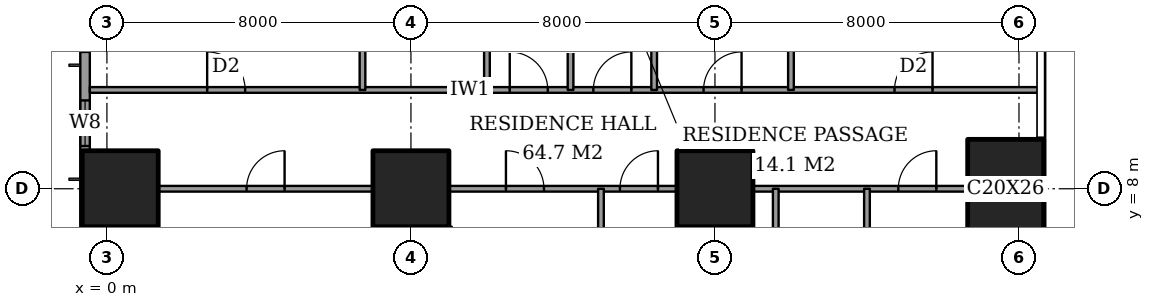
"""IFC4 building model, lengths in metres.
Left out: names, types, materials, properties, quantities, classifications, styles, units other than length and angle.
Written with IfcOpenShell. Run it as: python <this file> out.ifc"""

import sys

from ifc_helpers import new_model, si_unit, direction, frame, frame_2d, origin, origin_2d, place, context, subcontext, project, spatial, rectangle, extrude, element, fill, save


model = new_model("IFC4")
c1 = context("Model", 3, precision=1e-05, world=origin(), true_north=direction((0.0, 1.0)))
c2 = subcontext(c1, "Body", "Model", "MODEL_VIEW")
j1 = project(units=[si_unit("LENGTHUNIT", "METRE"), si_unit("PLANEANGLEUNIT", "RADIAN")], contexts=[c1])
p1 = place(None, origin())
s1 = spatial("IfcSite", under=j1, at=p1, CompositionType="ELEMENT")
p2 = place(p1, origin())
s2 = spatial("IfcBuilding", under=s1, at=p2, CompositionType="ELEMENT")
p3 = place(p2, frame((0.0, 0.0, 54.8)))
s3 = spatial("IfcBuildingStorey", under=s2, at=p3, CompositionType="ELEMENT", Elevation=54.8)
for number, where, z_axis, x_axis in (
    (1, (0.35, 8.0, 0.0), (0.0, 0.0, 1.0), (1.0, 0.0, 0.0)),
    (2, (8.0, 8.0, 0.0), (0.0, 0.0, 1.0), (1.0, 0.0, 0.0)),
    (3, (16.0, 8.0, 0.0), (0.0, 0.0, 1.0), (1.0, 0.0, 0.0)),
):
    element("IfcColumn", number, at=place(p3, frame(where, z_axis=z_axis, x_axis=x_axis)), inside=s3, PredefinedType="COLUMN", context=c2, shape_type="SweptSolid", body=[
        extrude(rectangle(XDim=2.0, YDim=2.0, at=origin_2d()), origin(), (0.0, 0.0, 1.0), 3.6),
    ])
p4 = place(p3, frame((23.65, 8.0, 0.0), z_axis=(0.0, 0.0, 1.0), x_axis=(1.0, 0.0, 0.0)))
e4 = element("IfcColumn", 4, at=p4, inside=s3, PredefinedType="COLUMN", context=c2, shape_type="SweptSolid", body=[
    extrude(rectangle(XDim=2.0, YDim=2.6, at=origin_2d()), origin(), (0.0, 0.0, 1.0), 3.6),
])
p5 = place(p3, frame((-0.575, 44.825, 0.0), z_axis=(0.0, 0.0, 1.0), x_axis=(0.0, -1.0, 0.0)))
e5 = element("IfcWall", 5, at=p5, inside=s3, PredefinedType="SOLIDWALL", context=c2, shape_type="SweptSolid", body=[
    extrude(rectangle(XDim=41.65, YDim=0.25, at=frame_2d((20.825, 0.0))), origin(), (0.0, 0.0, 1.0), 3.6),
])
p6 = place(p5, frame((0.775, 0.0, 0.6)))
e6 = element("IfcOpeningElement", 6, at=p6, cuts=e5, PredefinedType="OPENING", context=c2, shape_type="SweptSolid", body=[
    extrude(rectangle(XDim=2.4, YDim=2.0, at=frame_2d((1.2, 1.0))), frame((0.0, 0.135, 0.0), z_axis=(0.0, -1.0, 0.0), x_axis=(1.0, 0.0, 0.0)), (0.0, 0.0, 1.0), 0.27),
])
p7 = place(p5, frame((6.1, 0.0, 0.6)))
e7 = element("IfcOpeningElement", 7, at=p7, cuts=e5, PredefinedType="OPENING", context=c2, shape_type="SweptSolid", body=[
    extrude(rectangle(XDim=1.2, YDim=2.0, at=frame_2d((0.6, 1.0))), frame((0.0, 0.135, 0.0), z_axis=(0.0, -1.0, 0.0), x_axis=(1.0, 0.0, 0.0)), (0.0, 0.0, 1.0), 0.27),
])
p8 = place(p5, frame((8.425, 0.0, 0.6)))
e8 = element("IfcOpeningElement", 8, at=p8, cuts=e5, PredefinedType="OPENING", context=c2, shape_type="SweptSolid", body=[
    extrude(rectangle(XDim=2.4, YDim=2.0, at=frame_2d((1.2, 1.0))), frame((0.0, 0.135, 0.0), z_axis=(0.0, -1.0, 0.0), x_axis=(1.0, 0.0, 0.0)), (0.0, 0.0, 1.0), 0.27),
])
p9 = place(p5, frame((15.625, 0.0, 0.6)))
e9 = element("IfcOpeningElement", 9, at=p9, cuts=e5, PredefinedType="OPENING", context=c2, shape_type="SweptSolid", body=[
    extrude(rectangle(XDim=2.4, YDim=2.0, at=frame_2d((1.2, 1.0))), frame((0.0, 0.135, 0.0), z_axis=(0.0, -1.0, 0.0), x_axis=(1.0, 0.0, 0.0)), (0.0, 0.0, 1.0), 0.27),
])
p10 = place(p5, frame((23.625, 0.0, 0.6)))
e10 = element("IfcOpeningElement", 10, at=p10, cuts=e5, PredefinedType="OPENING", context=c2, shape_type="SweptSolid", body=[
    extrude(rectangle(XDim=2.4, YDim=2.0, at=frame_2d((1.2, 1.0))), frame((0.0, 0.135, 0.0), z_axis=(0.0, -1.0, 0.0), x_axis=(1.0, 0.0, 0.0)), (0.0, 0.0, 1.0), 0.27),
])
p11 = place(p5, frame((30.825, 0.0, 0.6)))
e11 = element("IfcOpeningElement", 11, at=p11, cuts=e5, PredefinedType="OPENING", context=c2, shape_type="SweptSolid", body=[
    extrude(rectangle(XDim=2.4, YDim=2.0, at=frame_2d((1.2, 1.0))), frame((0.0, 0.135, 0.0), z_axis=(0.0, -1.0, 0.0), x_axis=(1.0, 0.0, 0.0)), (0.0, 0.0, 1.0), 0.27),
])
p12 = place(p5, frame((34.5, 0.0, 0.6)))
e12 = element("IfcOpeningElement", 12, at=p12, cuts=e5, PredefinedType="OPENING", context=c2, shape_type="SweptSolid", body=[
    extrude(rectangle(XDim=1.2, YDim=2.0, at=frame_2d((0.6, 1.0))), frame((0.0, 0.135, 0.0), z_axis=(0.0, -1.0, 0.0), x_axis=(1.0, 0.0, 0.0)), (0.0, 0.0, 1.0), 0.27),
])
p13 = place(p5, frame((38.475, 0.0, 0.6)))
e13 = element("IfcOpeningElement", 13, at=p13, cuts=e5, PredefinedType="OPENING", context=c2, shape_type="SweptSolid", body=[
    extrude(rectangle(XDim=2.4, YDim=2.0, at=frame_2d((1.2, 1.0))), frame((0.0, 0.135, 0.0), z_axis=(0.0, -1.0, 0.0), x_axis=(1.0, 0.0, 0.0)), (0.0, 0.0, 1.0), 0.27),
])
p14 = place(p3, frame((1.35, 8.0, 0.0), z_axis=(0.0, 0.0, 1.0), x_axis=(1.0, 0.0, 0.0)))
e14 = element("IfcWall", 14, at=p14, inside=s3, PredefinedType="PARTITIONING", context=c2, shape_type="SweptSolid", body=[
    extrude(rectangle(XDim=5.65, YDim=0.15, at=frame_2d((2.825, 0.0))), origin(), (0.0, 0.0, 1.0), 3.35),
])
p15 = place(p14, frame((2.325, 0.0, 0.0)))
e15 = element("IfcOpeningElement", 15, at=p15, cuts=e14, PredefinedType="OPENING", context=c2, shape_type="SweptSolid", body=[
    extrude(rectangle(XDim=1.0, YDim=2.1, at=frame_2d((0.5, 1.05))), frame((0.0, 0.085, 0.0), z_axis=(0.0, -1.0, 0.0), x_axis=(1.0, 0.0, 0.0)), (0.0, 0.0, 1.0), 0.17),
])
p16 = place(p3, frame((9.0, 8.0, 0.0), z_axis=(0.0, 0.0, 1.0), x_axis=(1.0, 0.0, 0.0)))
e16 = element("IfcWall", 16, at=p16, inside=s3, PredefinedType="PARTITIONING", context=c2, shape_type="SweptSolid", body=[
    extrude(rectangle(XDim=6.0, YDim=0.15, at=frame_2d((3.0, 0.0))), origin(), (0.0, 0.0, 1.0), 3.35),
])
p17 = place(p16, frame((1.5, 0.0, 0.0)))
e17 = element("IfcOpeningElement", 17, at=p17, cuts=e16, PredefinedType="OPENING", context=c2, shape_type="SweptSolid", body=[
    extrude(rectangle(XDim=1.0, YDim=2.1, at=frame_2d((0.5, 1.05))), frame((0.0, 0.085, 0.0), z_axis=(0.0, -1.0, 0.0), x_axis=(1.0, 0.0, 0.0)), (0.0, 0.0, 1.0), 0.17),
])
p18 = place(p16, frame((4.5, 0.0, 0.0)))
e18 = element("IfcOpeningElement", 18, at=p18, cuts=e16, PredefinedType="OPENING", context=c2, shape_type="SweptSolid", body=[
    extrude(rectangle(XDim=1.0, YDim=2.1, at=frame_2d((0.5, 1.05))), frame((0.0, 0.085, 0.0), z_axis=(0.0, -1.0, 0.0), x_axis=(1.0, 0.0, 0.0)), (0.0, 0.0, 1.0), 0.17),
])
p19 = place(p3, frame((17.0, 8.0, 0.0), z_axis=(0.0, 0.0, 1.0), x_axis=(1.0, 0.0, 0.0)))
e19 = element("IfcWall", 19, at=p19, inside=s3, PredefinedType="PARTITIONING", context=c2, shape_type="SweptSolid", body=[
    extrude(rectangle(XDim=5.65, YDim=0.15, at=frame_2d((2.825, 0.0))), origin(), (0.0, 0.0, 1.0), 3.35),
])
p20 = place(p19, frame((3.825, 0.0, 0.0)))
e20 = element("IfcOpeningElement", 20, at=p20, cuts=e19, PredefinedType="OPENING", context=c2, shape_type="SweptSolid", body=[
    extrude(rectangle(XDim=1.0, YDim=2.1, at=frame_2d((0.5, 1.05))), frame((0.0, 0.085, 0.0), z_axis=(0.0, -1.0, 0.0), x_axis=(1.0, 0.0, 0.0)), (0.0, 0.0, 1.0), 0.17),
])
p21 = place(p3, frame((-0.45, 10.6, 0.0), z_axis=(0.0, 0.0, 1.0), x_axis=(1.0, 0.0, 0.0)))
e21 = element("IfcWall", 21, at=p21, inside=s3, PredefinedType="PARTITIONING", context=c2, shape_type="SweptSolid", body=[
    extrude(rectangle(XDim=25.011, YDim=0.15, at=frame_2d((12.505, 0.0))), origin(), (0.0, 0.0, 1.0), 3.35),
])
p22 = place(p21, frame((13.25, 0.0, 0.0)))
e22 = element("IfcOpeningElement", 22, at=p22, cuts=e21, PredefinedType="OPENING", context=c2, shape_type="SweptSolid", body=[
    extrude(rectangle(XDim=1.0, YDim=2.1, at=frame_2d((0.5, 1.05))), frame((0.0, 0.085, 0.0), z_axis=(0.0, -1.0, 0.0), x_axis=(1.0, 0.0, 0.0)), (0.0, 0.0, 1.0), 0.17),
])
p23 = place(p21, frame((3.087, 0.0, 0.0)))
e23 = element("IfcOpeningElement", 23, at=p23, cuts=e21, PredefinedType="OPENING", context=c2, shape_type="SweptSolid", body=[
    extrude(rectangle(XDim=1.0, YDim=2.1, at=frame_2d((0.5, 1.05))), frame((0.0, 0.085, 0.0), z_axis=(0.0, -1.0, 0.0), x_axis=(1.0, 0.0, 0.0)), (0.0, 0.0, 1.0), 0.17),
])
p24 = place(p21, frame((11.05, 0.0, 0.0)))
e24 = element("IfcOpeningElement", 24, at=p24, cuts=e21, PredefinedType="OPENING", context=c2, shape_type="SweptSolid", body=[
    extrude(rectangle(XDim=1.0, YDim=2.1, at=frame_2d((0.5, 1.05))), frame((0.0, 0.085, 0.0), z_axis=(0.0, -1.0, 0.0), x_axis=(1.0, 0.0, 0.0)), (0.0, 0.0, 1.0), 0.17),
])
p25 = place(p21, frame((16.15, 0.0, 0.0)))
e25 = element("IfcOpeningElement", 25, at=p25, cuts=e21, PredefinedType="OPENING", context=c2, shape_type="SweptSolid", body=[
    extrude(rectangle(XDim=1.0, YDim=2.1, at=frame_2d((0.5, 1.05))), frame((0.0, 0.085, 0.0), z_axis=(0.0, -1.0, 0.0), x_axis=(1.0, 0.0, 0.0)), (0.0, 0.0, 1.0), 0.17),
])
p26 = place(p21, frame((21.175, 0.0, 0.0)))
e26 = element("IfcOpeningElement", 26, at=p26, cuts=e21, PredefinedType="OPENING", context=c2, shape_type="SweptSolid", body=[
    extrude(rectangle(XDim=1.0, YDim=2.1, at=frame_2d((0.5, 1.05))), frame((0.0, 0.085, 0.0), z_axis=(0.0, -1.0, 0.0), x_axis=(1.0, 0.0, 0.0)), (0.0, 0.0, 1.0), 0.17),
])
p27 = place(p3, frame((6.725, 10.6, 0.0), z_axis=(0.0, 0.0, 1.0), x_axis=(0.0, 1.0, 0.0)))
e27 = element("IfcWall", 27, at=p27, inside=s3, PredefinedType="PARTITIONING", context=c2, shape_type="SweptSolid", body=[
    extrude(rectangle(XDim=4.2, YDim=0.15, at=frame_2d((2.1, 0.0))), origin(), (0.0, 0.0, 1.0), 3.35),
])
p28 = place(p27, frame((1.2, 0.0, 0.0)))
e28 = element("IfcOpeningElement", 28, at=p28, cuts=e27, PredefinedType="OPENING", context=c2, shape_type="SweptSolid", body=[
    extrude(rectangle(XDim=0.9, YDim=2.1, at=frame_2d((0.45, 1.05))), frame((0.0, 0.085, 0.0), z_axis=(0.0, -1.0, 0.0), x_axis=(1.0, 0.0, 0.0)), (0.0, 0.0, 1.0), 0.17),
])
p29 = place(p3, frame((10.0, 10.6, 0.0), z_axis=(0.0, 0.0, 1.0), x_axis=(0.0, 1.0, 0.0)))
e29 = element("IfcWall", 29, at=p29, inside=s3, PredefinedType="PARTITIONING", context=c2, shape_type="SweptSolid", body=[
    extrude(rectangle(XDim=11.0, YDim=0.15, at=frame_2d((5.5, 0.0))), origin(), (0.0, 0.0, 1.0), 3.35),
])
p30 = place(p29, frame((8.2, 0.0, 0.0)))
e30 = element("IfcOpeningElement", 30, at=p30, cuts=e29, PredefinedType="OPENING", context=c2, shape_type="SweptSolid", body=[
    extrude(rectangle(XDim=1.0, YDim=2.1, at=frame_2d((0.5, 1.05))), frame((0.0, 0.085, 0.0), z_axis=(0.0, -1.0, 0.0), x_axis=(1.0, 0.0, 0.0)), (0.0, 0.0, 1.0), 0.17),
])
p31 = place(p3, frame((12.2, 10.6, 0.0), z_axis=(0.0, 0.0, 1.0), x_axis=(0.0, 1.0, 0.0)))
e31 = element("IfcWall", 31, at=p31, inside=s3, PredefinedType="PARTITIONING", context=c2, shape_type="SweptSolid", body=[
    extrude(rectangle(XDim=6.4, YDim=0.15, at=frame_2d((3.2, 0.0))), origin(), (0.0, 0.0, 1.0), 3.35),
])
p32 = place(p3, frame((13.0, -0.45, 0.0), z_axis=(0.0, 0.0, 1.0), x_axis=(0.0, 1.0, 0.0)))
e32 = element("IfcWall", 32, at=p32, inside=s3, PredefinedType="PARTITIONING", context=c2, shape_type="SweptSolid", body=[
    extrude(rectangle(XDim=8.45, YDim=0.15, at=frame_2d((4.225, 0.0))), origin(), (0.0, 0.0, 1.0), 3.35),
])
p33 = place(p3, frame((14.4, 10.6, 0.0), z_axis=(0.0, 0.0, 1.0), x_axis=(0.0, 1.0, 0.0)))
e33 = element("IfcWall", 33, at=p33, inside=s3, PredefinedType="PARTITIONING", context=c2, shape_type="SweptSolid", body=[
    extrude(rectangle(XDim=6.4, YDim=0.15, at=frame_2d((3.2, 0.0))), origin(), (0.0, 0.0, 1.0), 3.35),
])
p34 = place(p3, frame((17.6, -0.45, 0.0), z_axis=(0.0, 0.0, 1.0), x_axis=(0.0, 1.0, 0.0)))
e34 = element("IfcWall", 34, at=p34, inside=s3, PredefinedType="PARTITIONING", context=c2, shape_type="SweptSolid", body=[
    extrude(rectangle(XDim=8.45, YDim=0.15, at=frame_2d((4.225, 0.0))), origin(), (0.0, 0.0, 1.0), 3.35),
])
p35 = place(p3, frame((18.0, 10.6, 0.0), z_axis=(0.0, 0.0, 1.0), x_axis=(0.0, 1.0, 0.0)))
e35 = element("IfcWall", 35, at=p35, inside=s3, PredefinedType="PARTITIONING", context=c2, shape_type="SweptSolid", body=[
    extrude(rectangle(XDim=6.4, YDim=0.15, at=frame_2d((3.2, 0.0))), origin(), (0.0, 0.0, 1.0), 3.35),
])
p36 = place(p3, frame((20.0, -0.45, 0.0), z_axis=(0.0, 0.0, 1.0), x_axis=(0.0, 1.0, 0.0)))
e36 = element("IfcWall", 36, at=p36, inside=s3, PredefinedType="PARTITIONING", context=c2, shape_type="SweptSolid", body=[
    extrude(rectangle(XDim=8.45, YDim=0.15, at=frame_2d((4.225, 0.0))), origin(), (0.0, 0.0, 1.0), 3.35),
])
p37 = place(p36, frame((3.775, 0.0, 0.0)))
e37 = element("IfcOpeningElement", 37, at=p37, cuts=e36, PredefinedType="OPENING", context=c2, shape_type="SweptSolid", body=[
    extrude(rectangle(XDim=0.9, YDim=2.1, at=frame_2d((0.45, 1.05))), frame((0.0, 0.085, 0.0), z_axis=(0.0, -1.0, 0.0), x_axis=(1.0, 0.0, 0.0)), (0.0, 0.0, 1.0), 0.17),
])
p38 = place(p12, origin())
e38 = element("IfcWindow", 38, at=p38, inside=s3, PartitioningType="SINGLE_PANEL", PredefinedType="WINDOW", context=c2, shape_type="SweptSolid", body=[
    extrude(rectangle(XDim=1.2, YDim=2.0, at=frame_2d((0.6, 1.0))), frame((0.0, 0.03, 0.0), z_axis=(0.0, -1.0, 0.0), x_axis=(1.0, 0.0, 0.0)), (0.0, 0.0, 1.0), 0.06),
])
fill(e12, e38)
p39 = place(p15, origin())
e39 = element("IfcDoor", 39, at=p39, inside=s3, OperationType="SINGLE_SWING_LEFT", PredefinedType="DOOR", context=c2, shape_type="SweptSolid", body=[
    extrude(rectangle(XDim=1.0, YDim=2.1, at=frame_2d((0.5, 1.05))), frame((0.0, 0.025, 0.0), z_axis=(0.0, -1.0, 0.0), x_axis=(1.0, 0.0, 0.0)), (0.0, 0.0, 1.0), 0.05),
])
fill(e15, e39)
p40 = place(p17, origin())
e40 = element("IfcDoor", 40, at=p40, inside=s3, OperationType="SINGLE_SWING_RIGHT", PredefinedType="DOOR", context=c2, shape_type="SweptSolid", body=[
    extrude(rectangle(XDim=1.0, YDim=2.1, at=frame_2d((0.5, 1.05))), frame((0.0, 0.025, 0.0), z_axis=(0.0, -1.0, 0.0), x_axis=(1.0, 0.0, 0.0)), (0.0, 0.0, 1.0), 0.05),
])
fill(e17, e40)
p41 = place(p18, origin())
e41 = element("IfcDoor", 41, at=p41, inside=s3, OperationType="SINGLE_SWING_LEFT", PredefinedType="DOOR", context=c2, shape_type="SweptSolid", body=[
    extrude(rectangle(XDim=1.0, YDim=2.1, at=frame_2d((0.5, 1.05))), frame((0.0, 0.025, 0.0), z_axis=(0.0, -1.0, 0.0), x_axis=(1.0, 0.0, 0.0)), (0.0, 0.0, 1.0), 0.05),
])
fill(e18, e41)
p42 = place(p20, origin())
e42 = element("IfcDoor", 42, at=p42, inside=s3, OperationType="SINGLE_SWING_LEFT", PredefinedType="DOOR", context=c2, shape_type="SweptSolid", body=[
    extrude(rectangle(XDim=1.0, YDim=2.1, at=frame_2d((0.5, 1.05))), frame((0.0, 0.025, 0.0), z_axis=(0.0, -1.0, 0.0), x_axis=(1.0, 0.0, 0.0)), (0.0, 0.0, 1.0), 0.05),
])
fill(e20, e42)
p43 = place(p22, origin())
e43 = element("IfcDoor", 43, at=p43, inside=s3, OperationType="SINGLE_SWING_LEFT", PredefinedType="DOOR", context=c2, shape_type="SweptSolid", body=[
    extrude(rectangle(XDim=1.0, YDim=2.1, at=frame_2d((0.5, 1.05))), frame((0.0, 0.025, 0.0), z_axis=(0.0, -1.0, 0.0), x_axis=(1.0, 0.0, 0.0)), (0.0, 0.0, 1.0), 0.05),
])
fill(e22, e43)
p44 = place(p23, origin())
e44 = element("IfcDoor", 44, at=p44, inside=s3, OperationType="SINGLE_SWING_RIGHT", PredefinedType="DOOR", context=c2, shape_type="SweptSolid", body=[
    extrude(rectangle(XDim=1.0, YDim=2.1, at=frame_2d((0.5, 1.05))), frame((0.0, 0.025, 0.0), z_axis=(0.0, -1.0, 0.0), x_axis=(1.0, 0.0, 0.0)), (0.0, 0.0, 1.0), 0.05),
])
fill(e23, e44)
p45 = place(p24, origin())
e45 = element("IfcDoor", 45, at=p45, inside=s3, OperationType="SINGLE_SWING_RIGHT", PredefinedType="DOOR", context=c2, shape_type="SweptSolid", body=[
    extrude(rectangle(XDim=1.0, YDim=2.1, at=frame_2d((0.5, 1.05))), frame((0.0, 0.025, 0.0), z_axis=(0.0, -1.0, 0.0), x_axis=(1.0, 0.0, 0.0)), (0.0, 0.0, 1.0), 0.05),
])
fill(e24, e45)
p46 = place(p25, origin())
e46 = element("IfcDoor", 46, at=p46, inside=s3, OperationType="SINGLE_SWING_LEFT", PredefinedType="DOOR", context=c2, shape_type="SweptSolid", body=[
    extrude(rectangle(XDim=1.0, YDim=2.1, at=frame_2d((0.5, 1.05))), frame((0.0, 0.025, 0.0), z_axis=(0.0, -1.0, 0.0), x_axis=(1.0, 0.0, 0.0)), (0.0, 0.0, 1.0), 0.05),
])
fill(e25, e46)
p47 = place(p26, origin())
e47 = element("IfcDoor", 47, at=p47, inside=s3, OperationType="SINGLE_SWING_LEFT", PredefinedType="DOOR", context=c2, shape_type="SweptSolid", body=[
    extrude(rectangle(XDim=1.0, YDim=2.1, at=frame_2d((0.5, 1.05))), frame((0.0, 0.025, 0.0), z_axis=(0.0, -1.0, 0.0), x_axis=(1.0, 0.0, 0.0)), (0.0, 0.0, 1.0), 0.05),
])
fill(e26, e47)
save(model, sys.argv[1])
